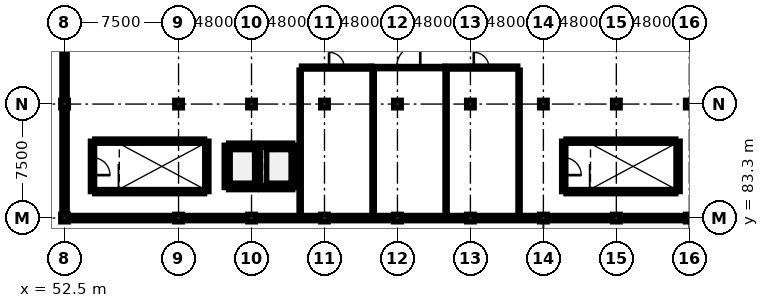
"""IFC4 building model, lengths in metres.
Left out: names, types, materials, properties, quantities, classifications, styles, units other than length and angle.
Written with IfcOpenShell. Run it as: python <this file> out.ifc"""

import sys

from ifc_helpers import new_model, si_unit, direction, frame, frame_2d, origin, origin_2d, place, context, subcontext, project, spatial, rectangle, extrude, element, fill, save


model = new_model("IFC4")
c1 = context("Model", 3, precision=1e-05, world=origin(), true_north=direction((0.0, 1.0)))
c2 = subcontext(c1, "Body", "Model", "MODEL_VIEW")
j1 = project(units=[si_unit("LENGTHUNIT", "METRE"), si_unit("PLANEANGLEUNIT", "RADIAN")], contexts=[c1])
p1 = place(None, origin())
s1 = spatial("IfcSite", under=j1, at=p1, CompositionType="ELEMENT")
p2 = place(p1, origin())
s2 = spatial("IfcBuilding", under=s1, at=p2, CompositionType="ELEMENT")
p3 = place(p2, frame((0.0, 0.0, 13.5)))
s3 = spatial("IfcBuildingStorey", under=s2, at=p3, CompositionType="ELEMENT", Elevation=13.5)
p4 = place(p3, frame((52.5, 83.3, 0.0), z_axis=(0.0, 0.0, 1.0), x_axis=(1.0, 0.0, 0.0)))
e1 = element("IfcColumn", 1, at=p4, inside=s3, PredefinedType="COLUMN", context=c2, shape_type="SweptSolid", body=[
    extrude(rectangle(XDim=0.5, YDim=0.5, at=origin_2d()), origin(), (0.0, 0.0, 1.0), 3.829),
])
p5 = place(p3, frame((52.5, 90.8, 0.0), z_axis=(0.0, 0.0, 1.0), x_axis=(1.0, 0.0, 0.0)))
e2 = element("IfcColumn", 2, at=p5, inside=s3, PredefinedType="COLUMN", context=c2, shape_type="SweptSolid", body=[
    extrude(rectangle(XDim=0.5, YDim=0.5, at=origin_2d()), origin(), (0.0, 0.0, 1.0), 4.429),
])
p6 = place(p3, frame((60.0, 83.3, 0.0), z_axis=(0.0, 0.0, 1.0), x_axis=(1.0, 0.0, 0.0)))
e3 = element("IfcColumn", 3, at=p6, inside=s3, PredefinedType="COLUMN", context=c2, shape_type="SweptSolid", body=[
    extrude(rectangle(XDim=0.5, YDim=0.5, at=origin_2d()), origin(), (0.0, 0.0, 1.0), 3.829),
])
p7 = place(p3, frame((60.0, 90.8, 0.0), z_axis=(0.0, 0.0, 1.0), x_axis=(1.0, 0.0, 0.0)))
e4 = element("IfcColumn", 4, at=p7, inside=s3, PredefinedType="COLUMN", context=c2, shape_type="SweptSolid", body=[
    extrude(rectangle(XDim=0.5, YDim=0.5, at=origin_2d()), origin(), (0.0, 0.0, 1.0), 4.429),
])
p8 = place(p3, frame((64.8, 83.3, 0.0), z_axis=(0.0, 0.0, 1.0), x_axis=(1.0, 0.0, 0.0)))
e5 = element("IfcColumn", 5, at=p8, inside=s3, PredefinedType="COLUMN", context=c2, shape_type="SweptSolid", body=[
    extrude(rectangle(XDim=0.5, YDim=0.5, at=origin_2d()), origin(), (0.0, 0.0, 1.0), 3.829),
])
p9 = place(p3, frame((64.8, 90.8, 0.0), z_axis=(0.0, 0.0, 1.0), x_axis=(1.0, 0.0, 0.0)))
e6 = element("IfcColumn", 6, at=p9, inside=s3, PredefinedType="COLUMN", context=c2, shape_type="SweptSolid", body=[
    extrude(rectangle(XDim=0.5, YDim=0.5, at=origin_2d()), origin(), (0.0, 0.0, 1.0), 4.429),
])
p10 = place(p3, frame((69.6, 83.3, 0.0), z_axis=(0.0, 0.0, 1.0), x_axis=(1.0, 0.0, 0.0)))
e7 = element("IfcColumn", 7, at=p10, inside=s3, PredefinedType="COLUMN", context=c2, shape_type="SweptSolid", body=[
    extrude(rectangle(XDim=0.5, YDim=0.5, at=origin_2d()), origin(), (0.0, 0.0, 1.0), 3.829),
])
p11 = place(p3, frame((69.6, 90.8, 0.0), z_axis=(0.0, 0.0, 1.0), x_axis=(1.0, 0.0, 0.0)))
e8 = element("IfcColumn", 8, at=p11, inside=s3, PredefinedType="COLUMN", context=c2, shape_type="SweptSolid", body=[
    extrude(rectangle(XDim=0.5, YDim=0.5, at=origin_2d()), origin(), (0.0, 0.0, 1.0), 4.429),
])
for number, where, z_axis, x_axis in (
    (9, (74.4, 83.3, 0.0), (0.0, 0.0, 1.0), (1.0, 0.0, 0.0)),
    (10, (74.4, 90.8, 0.0), (0.0, 0.0, 1.0), (1.0, 0.0, 0.0)),
    (11, (79.2, 83.3, 0.0), (0.0, 0.0, 1.0), (1.0, 0.0, 0.0)),
    (12, (79.2, 90.8, 0.0), (0.0, 0.0, 1.0), (1.0, 0.0, 0.0)),
    (13, (84.0, 83.3, 0.0), (0.0, 0.0, 1.0), (1.0, 0.0, 0.0)),
    (14, (84.0, 90.8, 0.0), (0.0, 0.0, 1.0), (1.0, 0.0, 0.0)),
    (15, (88.8, 83.3, 0.0), (0.0, 0.0, 1.0), (1.0, 0.0, 0.0)),
    (16, (88.8, 90.8, 0.0), (0.0, 0.0, 1.0), (1.0, 0.0, 0.0)),
    (17, (93.6, 83.3, 0.0), (0.0, 0.0, 1.0), (1.0, 0.0, 0.0)),
    (18, (93.6, 90.8, 0.0), (0.0, 0.0, 1.0), (1.0, 0.0, 0.0)),
):
    element("IfcColumn", number, at=place(p3, frame(where, z_axis=z_axis, x_axis=x_axis)), inside=s3, PredefinedType="COLUMN", context=c2, shape_type="SweptSolid", body=[
        extrude(rectangle(XDim=0.5, YDim=0.5, at=origin_2d()), origin(), (0.0, 0.0, 1.0), 3.8),
    ])
p12 = place(p3, frame((93.35, 83.3, 0.0), z_axis=(0.0, 0.0, 1.0), x_axis=(-1.0, 0.0, 0.0)))
e19 = element("IfcWall", 19, at=p12, inside=s3, PredefinedType="SOLIDWALL", context=c2, shape_type="SweptSolid", body=[
    extrude(rectangle(XDim=4.3, YDim=0.35, at=frame_2d((2.15, 0.0))), origin(), (0.0, 0.0, 1.0), 3.7),
])
p13 = place(p12, frame((1.05, 0.0, 0.9)))
e20 = element("IfcOpeningElement", 20, at=p13, cuts=e19, PredefinedType="OPENING", context=c2, shape_type="SweptSolid", body=[
    extrude(rectangle(XDim=2.2, YDim=1.3, at=frame_2d((1.1, 0.65))), frame((0.0, 0.187, 0.0), z_axis=(0.0, -1.0, 0.0), x_axis=(1.0, 0.0, 0.0)), (0.0, 0.0, 1.0), 0.374),
])
p14 = place(p3, frame((88.55, 83.3, 0.0), z_axis=(0.0, 0.0, 1.0), x_axis=(-1.0, 0.0, 0.0)))
e21 = element("IfcWall", 21, at=p14, inside=s3, PredefinedType="SOLIDWALL", context=c2, shape_type="SweptSolid", body=[
    extrude(rectangle(XDim=4.3, YDim=0.35, at=frame_2d((2.15, 0.0))), origin(), (0.0, 0.0, 1.0), 3.7),
])
p15 = place(p14, frame((1.05, 0.0, 0.9)))
e22 = element("IfcOpeningElement", 22, at=p15, cuts=e21, PredefinedType="OPENING", context=c2, shape_type="SweptSolid", body=[
    extrude(rectangle(XDim=2.2, YDim=1.5, at=frame_2d((1.1, 0.75))), frame((0.0, 0.187, 0.0), z_axis=(0.0, -1.0, 0.0), x_axis=(1.0, 0.0, 0.0)), (0.0, 0.0, 1.0), 0.374),
])
for number, where, z_axis, x_axis in (
    (23, (83.75, 83.3, 0.0), (0.0, 0.0, 1.0), (-1.0, 0.0, 0.0)),
    (24, (78.95, 83.3, 0.0), (0.0, 0.0, 1.0), (-1.0, 0.0, 0.0)),
):
    element("IfcWall", number, at=place(p3, frame(where, z_axis=z_axis, x_axis=x_axis)), inside=s3, PredefinedType="SOLIDWALL", context=c2, shape_type="SweptSolid", body=[
        extrude(rectangle(XDim=4.3, YDim=0.35, at=frame_2d((2.15, 0.0))), origin(), (0.0, 0.0, 1.0), 3.7),
    ])
p16 = place(p3, frame((74.15, 83.3, 0.0), z_axis=(0.0, 0.0, 1.0), x_axis=(-1.0, 0.0, 0.0)))
e25 = element("IfcWall", 25, at=p16, inside=s3, PredefinedType="SOLIDWALL", context=c2, shape_type="SweptSolid", body=[
    extrude(rectangle(XDim=4.3, YDim=0.35, at=frame_2d((2.15, 0.0))), origin(), (0.0, 0.0, 1.0), 3.7),
])
p17 = place(p3, frame((69.35, 83.3, 0.0), z_axis=(0.0, 0.0, 1.0), x_axis=(-1.0, 0.0, 0.0)))
e26 = element("IfcWall", 26, at=p17, inside=s3, PredefinedType="SOLIDWALL", context=c2, shape_type="SweptSolid", body=[
    extrude(rectangle(XDim=4.3, YDim=0.35, at=frame_2d((2.15, 0.0))), origin(), (0.0, 0.0, 1.0), 3.7),
])
p18 = place(p3, frame((64.55, 83.3, 0.0), z_axis=(0.0, 0.0, 1.0), x_axis=(-1.0, 0.0, 0.0)))
e27 = element("IfcWall", 27, at=p18, inside=s3, PredefinedType="SOLIDWALL", context=c2, shape_type="SweptSolid", body=[
    extrude(rectangle(XDim=4.3, YDim=0.35, at=frame_2d((2.15, 0.0))), origin(), (0.0, 0.0, 1.0), 3.7),
])
p19 = place(p18, frame((1.05, 0.0, 0.9)))
e28 = element("IfcOpeningElement", 28, at=p19, cuts=e27, PredefinedType="OPENING", context=c2, shape_type="SweptSolid", body=[
    extrude(rectangle(XDim=2.2, YDim=1.7, at=frame_2d((1.1, 0.85))), frame((0.0, 0.187, 0.0), z_axis=(0.0, -1.0, 0.0), x_axis=(1.0, 0.0, 0.0)), (0.0, 0.0, 1.0), 0.374),
])
p20 = place(p3, frame((59.75, 83.3, 0.0), z_axis=(0.0, 0.0, 1.0), x_axis=(-1.0, 0.0, 0.0)))
e29 = element("IfcWall", 29, at=p20, inside=s3, PredefinedType="SOLIDWALL", context=c2, shape_type="SweptSolid", body=[
    extrude(rectangle(XDim=7.0, YDim=0.35, at=frame_2d((3.5, 0.0))), origin(), (0.0, 0.0, 1.0), 3.7),
])
p21 = place(p20, frame((2.4, 0.0, 0.9)))
e30 = element("IfcOpeningElement", 30, at=p21, cuts=e29, PredefinedType="OPENING", context=c2, shape_type="SweptSolid", body=[
    extrude(rectangle(XDim=2.2, YDim=1.9, at=frame_2d((1.1, 0.95))), frame((0.0, 0.187, 0.0), z_axis=(0.0, -1.0, 0.0), x_axis=(1.0, 0.0, 0.0)), (0.0, 0.0, 1.0), 0.374),
])
p22 = place(p3, frame((52.5, 83.55, 0.0), z_axis=(0.0, 0.0, 1.0), x_axis=(0.0, 1.0, 0.0)))
e31 = element("IfcWall", 31, at=p22, inside=s3, PredefinedType="SOLIDWALL", context=c2, shape_type="SweptSolid", body=[
    extrude(rectangle(XDim=7.0, YDim=0.35, at=frame_2d((3.5, 0.0))), origin(), (0.0, 0.0, 1.0), 3.7),
])
p23 = place(p22, frame((2.3, 0.0, 0.9)))
e32 = element("IfcOpeningElement", 32, at=p23, cuts=e31, PredefinedType="OPENING", context=c2, shape_type="SweptSolid", body=[
    extrude(rectangle(XDim=2.4, YDim=1.3, at=frame_2d((1.2, 0.65))), frame((0.0, 0.187, 0.0), z_axis=(0.0, -1.0, 0.0), x_axis=(1.0, 0.0, 0.0)), (0.0, 0.0, 1.0), 0.374),
])
p24 = place(p3, frame((52.5, 91.05, 0.0), z_axis=(0.0, 0.0, 1.0), x_axis=(0.0, 1.0, 0.0)))
e33 = element("IfcWall", 33, at=p24, inside=s3, PredefinedType="SOLIDWALL", context=c2, shape_type="SweptSolid", body=[
    extrude(rectangle(XDim=7.0, YDim=0.35, at=frame_2d((3.5, 0.0))), origin(), (0.0, 0.0, 1.0), 3.7),
])
p25 = place(p3, frame((54.485, 85.04, 0.0), z_axis=(0.0, 0.0, 1.0), x_axis=(1.0, 0.0, 0.0)))
e34 = element("IfcWall", 34, at=p25, inside=s3, PredefinedType="SHEAR", context=c2, shape_type="SweptSolid", body=[
    extrude(rectangle(XDim=7.23, YDim=0.28, at=frame_2d((3.615, 0.0))), origin(), (0.0, 0.0, 1.0), 3.72),
])
p26 = place(p3, frame((61.86, 85.04, 0.0), z_axis=(0.0, 0.0, 1.0), x_axis=(0.0, 1.0, 0.0)))
e35 = element("IfcWall", 35, at=p26, inside=s3, PredefinedType="SHEAR", context=c2, shape_type="SweptSolid", body=[
    extrude(rectangle(XDim=3.32, YDim=0.28, at=frame_2d((1.66, 0.0))), origin(), (0.0, 0.0, 1.0), 3.72),
])
p27 = place(p3, frame((61.715, 88.36, 0.0), z_axis=(0.0, 0.0, 1.0), x_axis=(-1.0, 0.0, 0.0)))
e36 = element("IfcWall", 36, at=p27, inside=s3, PredefinedType="SHEAR", context=c2, shape_type="SweptSolid", body=[
    extrude(rectangle(XDim=7.23, YDim=0.28, at=frame_2d((3.615, 0.0))), origin(), (0.0, 0.0, 1.0), 3.72),
])
p28 = place(p3, frame((54.34, 88.36, 0.0), z_axis=(0.0, 0.0, 1.0), x_axis=(0.0, -1.0, 0.0)))
e37 = element("IfcWall", 37, at=p28, inside=s3, PredefinedType="SHEAR", context=c2, shape_type="SweptSolid", body=[
    extrude(rectangle(XDim=3.32, YDim=0.28, at=frame_2d((1.66, 0.0))), origin(), (0.0, 0.0, 1.0), 3.72),
])
p29 = place(p28, frame((1.085, 0.0, 0.0)))
e38 = element("IfcOpeningElement", 38, at=p29, cuts=e37, PredefinedType="OPENING", context=c2, shape_type="SweptSolid", body=[
    extrude(rectangle(XDim=1.15, YDim=2.15, at=frame_2d((0.575, 1.075))), frame((0.0, 0.152, 0.0), z_axis=(0.0, -1.0, 0.0), x_axis=(1.0, 0.0, 0.0)), (0.0, 0.0, 1.0), 0.304),
])
p30 = place(p3, frame((63.286, 85.307, 0.0), z_axis=(0.0, 0.0, 1.0), x_axis=(1.0, 0.0, 0.0)))
e39 = element("IfcWall", 39, at=p30, inside=s3, PredefinedType="SHEAR", context=c2, shape_type="SweptSolid", body=[
    extrude(rectangle(XDim=1.828, YDim=0.28, at=frame_2d((0.914, 0.0))), origin(), (0.0, 0.0, 1.0), 5.3),
])
p31 = place(p3, frame((65.259, 85.307, 0.0), z_axis=(0.0, 0.0, 1.0), x_axis=(0.0, 1.0, 0.0)))
e40 = element("IfcWall", 40, at=p31, inside=s3, PredefinedType="SHEAR", context=c2, shape_type="SweptSolid", body=[
    extrude(rectangle(XDim=2.787, YDim=0.28, at=frame_2d((1.393, 0.0))), origin(), (0.0, 0.0, 1.0), 5.3),
])
p32 = place(p3, frame((65.114, 88.093, 0.0), z_axis=(0.0, 0.0, 1.0), x_axis=(-1.0, 0.0, 0.0)))
e41 = element("IfcWall", 41, at=p32, inside=s3, PredefinedType="SHEAR", context=c2, shape_type="SweptSolid", body=[
    extrude(rectangle(XDim=1.828, YDim=0.28, at=frame_2d((0.914, 0.0))), origin(), (0.0, 0.0, 1.0), 5.3),
])
p33 = place(p32, frame((0.314, 0.0, 0.0)))
e42 = element("IfcOpeningElement", 42, at=p33, cuts=e41, PredefinedType="OPENING", context=c2, shape_type="SweptSolid", body=[
    extrude(rectangle(XDim=1.2, YDim=2.15, at=frame_2d((0.6, 1.075))), frame((0.0, 0.152, 0.0), z_axis=(0.0, -1.0, 0.0), x_axis=(1.0, 0.0, 0.0)), (0.0, 0.0, 1.0), 0.304),
])
p34 = place(p3, frame((63.141, 88.093, 0.0), z_axis=(0.0, 0.0, 1.0), x_axis=(0.0, -1.0, 0.0)))
e43 = element("IfcWall", 43, at=p34, inside=s3, PredefinedType="SHEAR", context=c2, shape_type="SweptSolid", body=[
    extrude(rectangle(XDim=2.787, YDim=0.28, at=frame_2d((1.393, 0.0))), origin(), (0.0, 0.0, 1.0), 5.3),
])
p35 = place(p3, frame((65.404, 85.307, 0.0), z_axis=(0.0, 0.0, 1.0), x_axis=(1.0, 0.0, 0.0)))
e44 = element("IfcWall", 44, at=p35, inside=s3, PredefinedType="SHEAR", context=c2, shape_type="SweptSolid", body=[
    extrude(rectangle(XDim=2.11, YDim=0.28, at=frame_2d((1.055, 0.0))), origin(), (0.0, 0.0, 1.0), 5.3),
])
p36 = place(p3, frame((67.659, 85.307, 0.0), z_axis=(0.0, 0.0, 1.0), x_axis=(0.0, 1.0, 0.0)))
e45 = element("IfcWall", 45, at=p36, inside=s3, PredefinedType="SHEAR", context=c2, shape_type="SweptSolid", body=[
    extrude(rectangle(XDim=2.787, YDim=0.28, at=frame_2d((1.393, 0.0))), origin(), (0.0, 0.0, 1.0), 5.3),
])
p37 = place(p3, frame((67.514, 88.093, 0.0), z_axis=(0.0, 0.0, 1.0), x_axis=(-1.0, 0.0, 0.0)))
e46 = element("IfcWall", 46, at=p37, inside=s3, PredefinedType="SHEAR", context=c2, shape_type="SweptSolid", body=[
    extrude(rectangle(XDim=2.11, YDim=0.28, at=frame_2d((1.055, 0.0))), origin(), (0.0, 0.0, 1.0), 5.3),
])
p38 = place(p37, frame((0.455, 0.0, 0.0)))
e47 = element("IfcOpeningElement", 47, at=p38, cuts=e46, PredefinedType="OPENING", context=c2, shape_type="SweptSolid", body=[
    extrude(rectangle(XDim=1.2, YDim=2.15, at=frame_2d((0.6, 1.075))), frame((0.0, 0.152, 0.0), z_axis=(0.0, -1.0, 0.0), x_axis=(1.0, 0.0, 0.0)), (0.0, 0.0, 1.0), 0.304),
])
p39 = place(p3, frame((85.485, 85.04, 0.0), z_axis=(0.0, 0.0, 1.0), x_axis=(1.0, 0.0, 0.0)))
e48 = element("IfcWall", 48, at=p39, inside=s3, PredefinedType="SHEAR", context=c2, shape_type="SweptSolid", body=[
    extrude(rectangle(XDim=7.23, YDim=0.28, at=frame_2d((3.615, 0.0))), origin(), (0.0, 0.0, 1.0), 3.72),
])
p40 = place(p3, frame((92.86, 85.04, 0.0), z_axis=(0.0, 0.0, 1.0), x_axis=(0.0, 1.0, 0.0)))
e49 = element("IfcWall", 49, at=p40, inside=s3, PredefinedType="SHEAR", context=c2, shape_type="SweptSolid", body=[
    extrude(rectangle(XDim=3.32, YDim=0.28, at=frame_2d((1.66, 0.0))), origin(), (0.0, 0.0, 1.0), 3.72),
])
p41 = place(p3, frame((92.715, 88.36, 0.0), z_axis=(0.0, 0.0, 1.0), x_axis=(-1.0, 0.0, 0.0)))
e50 = element("IfcWall", 50, at=p41, inside=s3, PredefinedType="SHEAR", context=c2, shape_type="SweptSolid", body=[
    extrude(rectangle(XDim=7.23, YDim=0.28, at=frame_2d((3.615, 0.0))), origin(), (0.0, 0.0, 1.0), 3.72),
])
p42 = place(p3, frame((85.34, 88.36, 0.0), z_axis=(0.0, 0.0, 1.0), x_axis=(0.0, -1.0, 0.0)))
e51 = element("IfcWall", 51, at=p42, inside=s3, PredefinedType="SHEAR", context=c2, shape_type="SweptSolid", body=[
    extrude(rectangle(XDim=3.32, YDim=0.28, at=frame_2d((1.66, 0.0))), origin(), (0.0, 0.0, 1.0), 3.72),
])
p43 = place(p42, frame((1.085, 0.0, 0.0)))
e52 = element("IfcOpeningElement", 52, at=p43, cuts=e51, PredefinedType="OPENING", context=c2, shape_type="SweptSolid", body=[
    extrude(rectangle(XDim=1.15, YDim=2.15, at=frame_2d((0.575, 1.075))), frame((0.0, 0.152, 0.0), z_axis=(0.0, -1.0, 0.0), x_axis=(1.0, 0.0, 0.0)), (0.0, 0.0, 1.0), 0.304),
])
p44 = place(p3, frame((68.085, 93.2, 0.0), z_axis=(0.0, 0.0, 1.0), x_axis=(1.0, 0.0, 0.0)))
e53 = element("IfcWall", 53, at=p44, inside=s3, PredefinedType="PARTITIONING", context=c2, shape_type="SweptSolid", body=[
    extrude(rectangle(XDim=4.63, YDim=0.2, at=frame_2d((2.315, 0.0))), origin(), (0.0, 0.0, 1.0), 3.7),
])
p45 = place(p44, frame((1.815, 0.0, 0.0)))
e54 = element("IfcOpeningElement", 54, at=p45, cuts=e53, PredefinedType="OPENING", context=c2, shape_type="SweptSolid", body=[
    extrude(rectangle(XDim=1.0, YDim=2.15, at=frame_2d((0.5, 1.075))), frame((0.0, 0.112, 0.0), z_axis=(0.0, -1.0, 0.0), x_axis=(1.0, 0.0, 0.0)), (0.0, 0.0, 1.0), 0.224),
])
p46 = place(p3, frame((72.727, 93.2, 0.0), z_axis=(0.0, 0.0, 1.0), x_axis=(1.0, 0.0, 0.0)))
e55 = element("IfcWall", 55, at=p46, inside=s3, PredefinedType="PARTITIONING", context=c2, shape_type="SweptSolid", body=[
    extrude(rectangle(XDim=4.788, YDim=0.15, at=frame_2d((2.394, 0.0))), origin(), (0.0, 0.0, 1.0), 3.7),
])
p47 = place(p46, frame((1.614, 0.0, 0.0)))
e56 = element("IfcOpeningElement", 56, at=p47, cuts=e55, PredefinedType="OPENING", context=c2, shape_type="SweptSolid", body=[
    extrude(rectangle(XDim=1.56, YDim=2.3, at=frame_2d((0.78, 1.15))), frame((0.0, 0.087, 0.0), z_axis=(0.0, -1.0, 0.0), x_axis=(1.0, 0.0, 0.0)), (0.0, 0.0, 1.0), 0.174),
])
p48 = place(p3, frame((77.527, 93.2, 0.0), z_axis=(0.0, 0.0, 1.0), x_axis=(1.0, 0.0, 0.0)))
e57 = element("IfcWall", 57, at=p48, inside=s3, PredefinedType="PARTITIONING", context=c2, shape_type="SweptSolid", body=[
    extrude(rectangle(XDim=4.788, YDim=0.2, at=frame_2d((2.394, 0.0))), origin(), (0.0, 0.0, 1.0), 3.7),
])
p49 = place(p48, frame((1.894, 0.0, 0.0)))
e58 = element("IfcOpeningElement", 58, at=p49, cuts=e57, PredefinedType="OPENING", context=c2, shape_type="SweptSolid", body=[
    extrude(rectangle(XDim=1.0, YDim=2.15, at=frame_2d((0.5, 1.075))), frame((0.0, 0.112, 0.0), z_axis=(0.0, -1.0, 0.0), x_axis=(1.0, 0.0, 0.0)), (0.0, 0.0, 1.0), 0.224),
])
p50 = place(p3, frame((68.0, 83.487, 0.0), z_axis=(0.0, 0.0, 1.0), x_axis=(0.0, 1.0, 0.0)))
e59 = element("IfcWall", 59, at=p50, inside=s3, PredefinedType="PARTITIONING", context=c2, shape_type="SweptSolid", body=[
    extrude(rectangle(XDim=9.548, YDim=0.15, at=frame_2d((4.774, 0.0))), origin(), (0.0, 0.0, 1.0), 3.7),
])
p51 = place(p3, frame((72.8, 83.487, 0.0), z_axis=(0.0, 0.0, 1.0), x_axis=(0.0, 1.0, 0.0)))
e60 = element("IfcWall", 60, at=p51, inside=s3, PredefinedType="PARTITIONING", context=c2, shape_type="SweptSolid", body=[
    extrude(rectangle(XDim=9.626, YDim=0.16, at=frame_2d((4.813, 0.0))), origin(), (0.0, 0.0, 1.0), 3.7),
])
p52 = place(p3, frame((77.6, 83.487, 0.0), z_axis=(0.0, 0.0, 1.0), x_axis=(0.0, 1.0, 0.0)))
e61 = element("IfcWall", 61, at=p52, inside=s3, PredefinedType="PARTITIONING", context=c2, shape_type="SweptSolid", body=[
    extrude(rectangle(XDim=9.621, YDim=0.15, at=frame_2d((4.811, 0.0))), origin(), (0.0, 0.0, 1.0), 3.7),
])
p53 = place(p3, frame((82.4, 83.487, 0.0), z_axis=(0.0, 0.0, 1.0), x_axis=(0.0, 1.0, 0.0)))
e62 = element("IfcWall", 62, at=p53, inside=s3, PredefinedType="PARTITIONING", context=c2, shape_type="SweptSolid", body=[
    extrude(rectangle(XDim=9.548, YDim=0.15, at=frame_2d((4.774, 0.0))), origin(), (0.0, 0.0, 1.0), 3.7),
])
p54 = place(p13, origin())
e63 = element("IfcWindow", 63, at=p54, inside=s3, PartitioningType="DOUBLE_PANEL_VERTICAL", PredefinedType="WINDOW", context=c2, shape_type="SweptSolid", body=[
    extrude(rectangle(XDim=2.2, YDim=1.3, at=frame_2d((1.1, 0.65))), frame((0.0, 0.03, 0.0), z_axis=(0.0, -1.0, 0.0), x_axis=(1.0, 0.0, 0.0)), (0.0, 0.0, 1.0), 0.06),
])
fill(e20, e63)
p55 = place(p15, origin())
e64 = element("IfcWindow", 64, at=p55, inside=s3, PartitioningType="DOUBLE_PANEL_VERTICAL", PredefinedType="WINDOW", context=c2, shape_type="SweptSolid", body=[
    extrude(rectangle(XDim=2.2, YDim=1.5, at=frame_2d((1.1, 0.75))), frame((0.0, 0.03, 0.0), z_axis=(0.0, -1.0, 0.0), x_axis=(1.0, 0.0, 0.0)), (0.0, 0.0, 1.0), 0.06),
])
fill(e22, e64)
p56 = place(p19, origin())
e65 = element("IfcWindow", 65, at=p56, inside=s3, PartitioningType="DOUBLE_PANEL_VERTICAL", PredefinedType="WINDOW", context=c2, shape_type="SweptSolid", body=[
    extrude(rectangle(XDim=2.2, YDim=1.7, at=frame_2d((1.1, 0.85))), frame((0.0, 0.03, 0.0), z_axis=(0.0, -1.0, 0.0), x_axis=(1.0, 0.0, 0.0)), (0.0, 0.0, 1.0), 0.06),
])
fill(e28, e65)
p57 = place(p21, origin())
e66 = element("IfcWindow", 66, at=p57, inside=s3, PartitioningType="DOUBLE_PANEL_VERTICAL", PredefinedType="WINDOW", context=c2, shape_type="SweptSolid", body=[
    extrude(rectangle(XDim=2.2, YDim=1.9, at=frame_2d((1.1, 0.95))), frame((0.0, 0.03, 0.0), z_axis=(0.0, -1.0, 0.0), x_axis=(1.0, 0.0, 0.0)), (0.0, 0.0, 1.0), 0.06),
])
fill(e30, e66)
p58 = place(p23, origin())
e67 = element("IfcWindow", 67, at=p58, inside=s3, PartitioningType="DOUBLE_PANEL_VERTICAL", PredefinedType="WINDOW", context=c2, shape_type="SweptSolid", body=[
    extrude(rectangle(XDim=2.4, YDim=1.3, at=frame_2d((1.2, 0.65))), frame((0.0, 0.03, 0.0), z_axis=(0.0, -1.0, 0.0), x_axis=(1.0, 0.0, 0.0)), (0.0, 0.0, 1.0), 0.06),
])
fill(e32, e67)
p59 = place(p29, origin())
e68 = element("IfcDoor", 68, at=p59, inside=s3, OperationType="SINGLE_SWING_RIGHT", PredefinedType="DOOR", context=c2, shape_type="SweptSolid", body=[
    extrude(rectangle(XDim=1.15, YDim=2.15, at=frame_2d((0.575, 1.075))), frame((0.0, 0.025, 0.0), z_axis=(0.0, -1.0, 0.0), x_axis=(1.0, 0.0, 0.0)), (0.0, 0.0, 1.0), 0.05),
])
fill(e38, e68)
p60 = place(p33, origin())
e69 = element("IfcDoor", 69, at=p60, inside=s3, OperationType="SLIDING_TO_LEFT", PredefinedType="DOOR", context=c2, shape_type="SweptSolid", body=[
    extrude(rectangle(XDim=1.2, YDim=2.15, at=frame_2d((0.6, 1.075))), frame((0.0, 0.025, 0.0), z_axis=(0.0, -1.0, 0.0), x_axis=(1.0, 0.0, 0.0)), (0.0, 0.0, 1.0), 0.05),
])
fill(e42, e69)
p61 = place(p38, origin())
e70 = element("IfcDoor", 70, at=p61, inside=s3, OperationType="SLIDING_TO_RIGHT", PredefinedType="DOOR", context=c2, shape_type="SweptSolid", body=[
    extrude(rectangle(XDim=1.2, YDim=2.15, at=frame_2d((0.6, 1.075))), frame((0.0, 0.025, 0.0), z_axis=(0.0, -1.0, 0.0), x_axis=(1.0, 0.0, 0.0)), (0.0, 0.0, 1.0), 0.05),
])
fill(e47, e70)
p62 = place(p43, origin())
e71 = element("IfcDoor", 71, at=p62, inside=s3, OperationType="SINGLE_SWING_RIGHT", PredefinedType="DOOR", context=c2, shape_type="SweptSolid", body=[
    extrude(rectangle(XDim=1.15, YDim=2.15, at=frame_2d((0.575, 1.075))), frame((0.0, 0.025, 0.0), z_axis=(0.0, -1.0, 0.0), x_axis=(1.0, 0.0, 0.0)), (0.0, 0.0, 1.0), 0.05),
])
fill(e52, e71)
p63 = place(p45, origin())
e72 = element("IfcDoor", 72, at=p63, inside=s3, OperationType="SINGLE_SWING_LEFT", PredefinedType="DOOR", context=c2, shape_type="SweptSolid", body=[
    extrude(rectangle(XDim=1.0, YDim=2.15, at=frame_2d((0.5, 1.075))), frame((0.0, 0.025, 0.0), z_axis=(0.0, -1.0, 0.0), x_axis=(1.0, 0.0, 0.0)), (0.0, 0.0, 1.0), 0.05),
])
fill(e54, e72)
p64 = place(p47, origin())
e73 = element("IfcDoor", 73, at=p64, inside=s3, OperationType="SINGLE_SWING_RIGHT", PredefinedType="DOOR", context=c2, shape_type="SweptSolid", body=[
    extrude(rectangle(XDim=1.56, YDim=2.3, at=frame_2d((0.78, 1.15))), frame((0.0, 0.025, 0.0), z_axis=(0.0, -1.0, 0.0), x_axis=(1.0, 0.0, 0.0)), (0.0, 0.0, 1.0), 0.05),
])
fill(e56, e73)
p65 = place(p49, origin())
e74 = element("IfcDoor", 74, at=p65, inside=s3, OperationType="SINGLE_SWING_LEFT", PredefinedType="DOOR", context=c2, shape_type="SweptSolid", body=[
    extrude(rectangle(XDim=1.0, YDim=2.15, at=frame_2d((0.5, 1.075))), frame((0.0, 0.025, 0.0), z_axis=(0.0, -1.0, 0.0), x_axis=(1.0, 0.0, 0.0)), (0.0, 0.0, 1.0), 0.05),
])
fill(e58, e74)
save(model, sys.argv[1])
